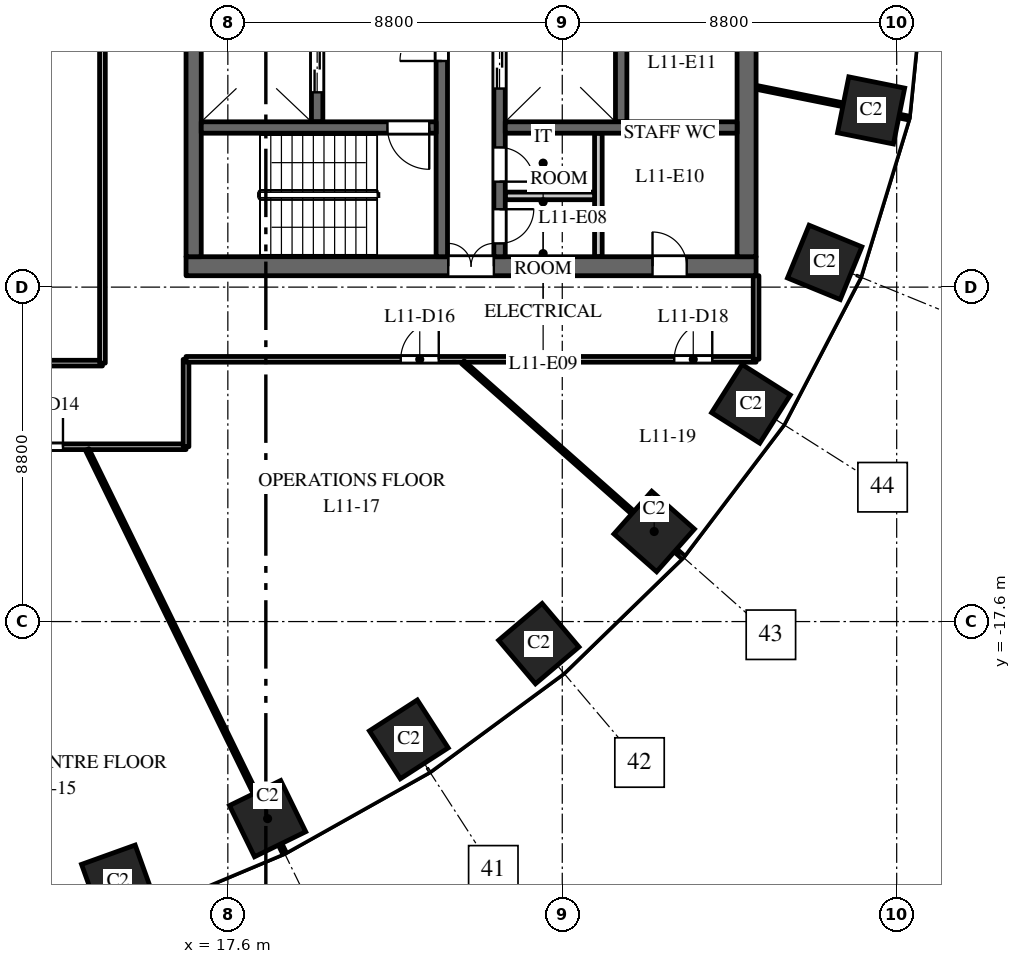
"""IFC4 building model, lengths in metres.
Left out: names, types, materials, properties, quantities, classifications, styles, units other than length and angle.
Written with IfcOpenShell. Run it as: python <this file> out.ifc"""

import sys

from ifc_helpers import new_model, si_unit, direction, frame, frame_2d, origin, origin_2d, place, context, subcontext, project, spatial, rectangle, extrude, element, fill, save


model = new_model("IFC4")
c1 = context("Model", 3, precision=1e-05, world=origin(), true_north=direction((0.0, 1.0)))
c2 = subcontext(c1, "Body", "Model", "MODEL_VIEW")
j1 = project(units=[si_unit("LENGTHUNIT", "METRE"), si_unit("PLANEANGLEUNIT", "RADIAN")], contexts=[c1])
p1 = place(None, origin())
s1 = spatial("IfcSite", under=j1, at=p1, CompositionType="ELEMENT")
p2 = place(p1, origin())
s2 = spatial("IfcBuilding", under=s1, at=p2, CompositionType="ELEMENT")
p3 = place(p2, frame((0.0, 0.0, 54.5)))
s3 = spatial("IfcBuildingStorey", under=s2, at=p3, CompositionType="ELEMENT", Elevation=54.5)
for number, where, z_axis, x_axis in (
    (1, (14.709, -24.441, 0.0), (0.0, 0.0, 1.0), (0.941, 0.338, 0.0)),
    (2, (18.646, -22.785, 0.0), (0.0, 0.0, 1.0), (0.898, 0.439, 0.0)),
    (3, (22.362, -20.7, 0.0), (0.0, 0.0, 1.0), (0.84, 0.542, 0.0)),
    (4, (25.783, -18.18, 0.0), (0.0, 0.0, 1.0), (0.763, 0.646, 0.0)),
    (5, (28.819, -15.23, 0.0), (0.0, 0.0, 1.0), (0.663, 0.749, 0.0)),
    (6, (31.365, -11.871, 0.0), (0.0, 0.0, 1.0), (0.535, 0.845, 0.0)),
    (7, (33.305, -8.149, 0.0), (0.0, 0.0, 1.0), (0.379, 0.925, 0.0)),
    (8, (34.527, -4.151, 0.0), (0.0, 0.0, 1.0), (0.197, 0.98, 0.0)),
):
    element("IfcColumn", number, at=place(p3, frame(where, z_axis=z_axis, x_axis=x_axis)), inside=s3, PredefinedType="COLUMN", context=c2, shape_type="SweptSolid", body=[
        extrude(rectangle(XDim=1.5, YDim=1.5, at=origin_2d()), origin(), (0.0, 0.0, 1.0), 4.0),
    ])
p4 = place(p3, frame((16.5, -8.25, 0.0), z_axis=(0.0, 0.0, 1.0), x_axis=(1.0, 0.0, 0.0)))
e9 = element("IfcWall", 9, at=p4, inside=s3, PredefinedType="SHEAR", context=c2, shape_type="SweptSolid", body=[
    extrude(rectangle(XDim=15.0, YDim=0.5, at=frame_2d((7.5, 0.0))), origin(), (0.0, 0.0, 1.0), 3.7),
])
p5 = place(p4, frame((6.9, 0.0, 0.0)))
e10 = element("IfcOpeningElement", 10, at=p5, cuts=e9, PredefinedType="OPENING", context=c2, shape_type="SweptSolid", body=[
    extrude(rectangle(XDim=1.2, YDim=2.1, at=frame_2d((0.6, 1.05))), frame((0.0, 0.26, 0.0), z_axis=(0.0, -1.0, 0.0), x_axis=(1.0, 0.0, 0.0)), (0.0, 0.0, 1.0), 0.52),
])
p6 = place(p4, frame((12.275, 0.0, 0.0)))
e11 = element("IfcOpeningElement", 11, at=p6, cuts=e9, PredefinedType="OPENING", context=c2, shape_type="SweptSolid", body=[
    extrude(rectangle(XDim=0.9, YDim=2.1, at=frame_2d((0.45, 1.05))), frame((0.0, 0.26, 0.0), z_axis=(0.0, -1.0, 0.0), x_axis=(1.0, 0.0, 0.0)), (0.0, 0.0, 1.0), 0.52),
])
p7 = place(p3, frame((27.95, -4.45, 0.0), z_axis=(0.0, 0.0, 1.0), x_axis=(0.0, 1.0, 0.0)))
e12 = element("IfcWall", 12, at=p7, inside=s3, PredefinedType="SHEAR", context=c2, shape_type="SweptSolid", body=[
    extrude(rectangle(XDim=8.9, YDim=0.3, at=frame_2d((4.45, 0.0))), origin(), (0.0, 0.0, 1.0), 3.7),
])
p8 = place(p3, frame((19.95, -4.45, 0.0), z_axis=(0.0, 0.0, 1.0), x_axis=(0.0, 1.0, 0.0)))
e13 = element("IfcWall", 13, at=p8, inside=s3, PredefinedType="SHEAR", context=c2, shape_type="SweptSolid", body=[
    extrude(rectangle(XDim=8.9, YDim=0.3, at=frame_2d((4.45, 0.0))), origin(), (0.0, 0.0, 1.0), 3.7),
])
p9 = place(p8, frame((0.775, 0.0, 0.0)))
e14 = element("IfcOpeningElement", 14, at=p9, cuts=e13, PredefinedType="OPENING", context=c2, shape_type="SweptSolid", body=[
    extrude(rectangle(XDim=1.2, YDim=2.1, at=frame_2d((0.6, 1.05))), frame((0.0, 0.16, 0.0), z_axis=(0.0, -1.0, 0.0), x_axis=(1.0, 0.0, 0.0)), (0.0, 0.0, 1.0), 0.32),
])
p10 = place(p8, frame((4.788, 0.0, 0.0)))
e15 = element("IfcOpeningElement", 15, at=p10, cuts=e13, PredefinedType="OPENING", context=c2, shape_type="SweptSolid", body=[
    extrude(rectangle(XDim=0.9, YDim=2.1, at=frame_2d((0.45, 1.05))), frame((0.0, 0.16, 0.0), z_axis=(0.0, -1.0, 0.0), x_axis=(1.0, 0.0, 0.0)), (0.0, 0.0, 1.0), 0.32),
])
p11 = place(p8, frame((7.337, 0.0, 0.0)))
e16 = element("IfcOpeningElement", 16, at=p11, cuts=e13, PredefinedType="OPENING", context=c2, shape_type="SweptSolid", body=[
    extrude(rectangle(XDim=0.9, YDim=2.1, at=frame_2d((0.45, 1.05))), frame((0.0, 0.16, 0.0), z_axis=(0.0, -1.0, 0.0), x_axis=(1.0, 0.0, 0.0)), (0.0, 0.0, 1.0), 0.32),
])
p12 = place(p3, frame((24.75, -8.0, 0.0), z_axis=(0.0, 0.0, 1.0), x_axis=(0.0, 1.0, 0.0)))
e17 = element("IfcWall", 17, at=p12, inside=s3, PredefinedType="SHEAR", context=c2, shape_type="SweptSolid", body=[
    extrude(rectangle(XDim=16.0, YDim=0.3, at=frame_2d((8.0, 0.0))), origin(), (0.0, 0.0, 1.0), 3.7),
])
p13 = place(p12, frame((4.425, 0.0, 0.0)))
e18 = element("IfcOpeningElement", 18, at=p13, cuts=e17, PredefinedType="OPENING", context=c2, shape_type="SweptSolid", body=[
    extrude(rectangle(XDim=1.1, YDim=2.1, at=frame_2d((0.55, 1.05))), frame((0.0, 0.16, 0.0), z_axis=(0.0, -1.0, 0.0), x_axis=(1.0, 0.0, 0.0)), (0.0, 0.0, 1.0), 0.32),
])
p14 = place(p12, frame((7.45, 0.0, 0.0)))
e19 = element("IfcOpeningElement", 19, at=p14, cuts=e17, PredefinedType="OPENING", context=c2, shape_type="SweptSolid", body=[
    extrude(rectangle(XDim=1.1, YDim=2.1, at=frame_2d((0.55, 1.05))), frame((0.0, 0.16, 0.0), z_axis=(0.0, -1.0, 0.0), x_axis=(1.0, 0.0, 0.0)), (0.0, 0.0, 1.0), 0.32),
])
p15 = place(p12, frame((10.425, 0.0, 0.0)))
e20 = element("IfcOpeningElement", 20, at=p15, cuts=e17, PredefinedType="OPENING", context=c2, shape_type="SweptSolid", body=[
    extrude(rectangle(XDim=1.2, YDim=2.1, at=frame_2d((0.6, 1.05))), frame((0.0, 0.16, 0.0), z_axis=(0.0, -1.0, 0.0), x_axis=(1.0, 0.0, 0.0)), (0.0, 0.0, 1.0), 0.32),
])
p16 = place(p12, frame((13.75, 0.0, 0.0)))
e21 = element("IfcOpeningElement", 21, at=p16, cuts=e17, PredefinedType="OPENING", context=c2, shape_type="SweptSolid", body=[
    extrude(rectangle(XDim=0.9, YDim=2.1, at=frame_2d((0.45, 1.05))), frame((0.0, 0.16, 0.0), z_axis=(0.0, -1.0, 0.0), x_axis=(1.0, 0.0, 0.0)), (0.0, 0.0, 1.0), 0.32),
])
p17 = place(p12, frame((1.975, 0.0, 0.0)))
e22 = element("IfcOpeningElement", 22, at=p17, cuts=e17, PredefinedType="OPENING", context=c2, shape_type="SweptSolid", body=[
    extrude(rectangle(XDim=0.9, YDim=2.1, at=frame_2d((0.45, 1.05))), frame((0.0, 0.16, 0.0), z_axis=(0.0, -1.0, 0.0), x_axis=(1.0, 0.0, 0.0)), (0.0, 0.0, 1.0), 0.32),
])
p18 = place(p12, frame((0.35, 0.0, 0.0)))
e23 = element("IfcOpeningElement", 23, at=p18, cuts=e17, PredefinedType="OPENING", context=c2, shape_type="SweptSolid", body=[
    extrude(rectangle(XDim=0.9, YDim=2.1, at=frame_2d((0.45, 1.05))), frame((0.0, 0.16, 0.0), z_axis=(0.0, -1.0, 0.0), x_axis=(1.0, 0.0, 0.0)), (0.0, 0.0, 1.0), 0.32),
])
p19 = place(p3, frame((16.7, -8.0, 0.0), z_axis=(0.0, 0.0, 1.0), x_axis=(0.0, 1.0, 0.0)))
e24 = element("IfcWall", 24, at=p19, inside=s3, PredefinedType="SHEAR", context=c2, shape_type="SweptSolid", body=[
    extrude(rectangle(XDim=16.0, YDim=0.4, at=frame_2d((8.0, 0.0))), origin(), (0.0, 0.0, 1.0), 3.7),
])
p20 = place(p3, frame((31.25, -8.0, 0.0), z_axis=(0.0, 0.0, 1.0), x_axis=(0.0, 1.0, 0.0)))
e25 = element("IfcWall", 25, at=p20, inside=s3, PredefinedType="SHEAR", context=c2, shape_type="SweptSolid", body=[
    extrude(rectangle(XDim=16.0, YDim=0.5, at=frame_2d((8.0, 0.0))), origin(), (0.0, 0.0, 1.0), 3.7),
])
p21 = place(p3, frame((27.35, -8.0, 0.0), z_axis=(0.0, 0.0, 1.0), x_axis=(0.0, 1.0, 0.0)))
e26 = element("IfcWall", 26, at=p21, inside=s3, PredefinedType="PARTITIONING", context=c2, shape_type="SweptSolid", body=[
    extrude(rectangle(XDim=3.25, YDim=0.2, at=frame_2d((1.625, 0.0))), origin(), (0.0, 0.0, 1.0), 3.7),
])
p22 = place(p3, frame((24.9, -6.4, 0.0), z_axis=(0.0, 0.0, 1.0), x_axis=(1.0, 0.0, 0.0)))
e27 = element("IfcWall", 27, at=p22, inside=s3, PredefinedType="PARTITIONING", context=c2, shape_type="SweptSolid", body=[
    extrude(rectangle(XDim=2.35, YDim=0.2, at=frame_2d((1.175, 0.0))), origin(), (0.0, 0.0, 1.0), 3.7),
])
p23 = place(p3, frame((24.9, -4.6, 0.0), z_axis=(0.0, 0.0, 1.0), x_axis=(1.0, 0.0, 0.0)))
e28 = element("IfcWall", 28, at=p23, inside=s3, PredefinedType="SHEAR", context=c2, shape_type="SweptSolid", body=[
    extrude(rectangle(XDim=6.1, YDim=0.3, at=frame_2d((3.05, 0.0))), origin(), (0.0, 0.0, 1.0), 3.7),
])
p24 = place(p3, frame((23.23, -8.0, 0.0), z_axis=(0.0, 0.0, 1.0), x_axis=(0.0, 1.0, 0.0)))
e29 = element("IfcWall", 29, at=p24, inside=s3, PredefinedType="SHEAR", context=c2, shape_type="SweptSolid", body=[
    extrude(rectangle(XDim=7.875, YDim=0.3, at=frame_2d((3.938, 0.0))), origin(), (0.0, 0.0, 1.0), 3.7),
])
p25 = place(p24, frame((5.15, 0.0, 0.0)))
e30 = element("IfcOpeningElement", 30, at=p25, cuts=e29, PredefinedType="OPENING", context=c2, shape_type="SweptSolid", body=[
    extrude(rectangle(XDim=1.1, YDim=2.1, at=frame_2d((0.55, 1.05))), frame((0.0, 0.16, 0.0), z_axis=(0.0, -1.0, 0.0), x_axis=(1.0, 0.0, 0.0)), (0.0, 0.0, 1.0), 0.32),
])
p26 = place(p3, frame((16.9, -4.6, 0.0), z_axis=(0.0, 0.0, 1.0), x_axis=(1.0, 0.0, 0.0)))
e31 = element("IfcWall", 31, at=p26, inside=s3, PredefinedType="SHEAR", context=c2, shape_type="SweptSolid", body=[
    extrude(rectangle(XDim=6.18, YDim=0.3, at=frame_2d((3.09, 0.0))), origin(), (0.0, 0.0, 1.0), 3.7),
])
p27 = place(p26, frame((4.9, 0.0, 0.0)))
e32 = element("IfcOpeningElement", 32, at=p27, cuts=e31, PredefinedType="OPENING", context=c2, shape_type="SweptSolid", body=[
    extrude(rectangle(XDim=1.1, YDim=2.1, at=frame_2d((0.55, 1.05))), frame((0.0, 0.16, 0.0), z_axis=(0.0, -1.0, 0.0), x_axis=(1.0, 0.0, 0.0)), (0.0, 0.0, 1.0), 0.32),
])
p28 = place(p3, frame((-14.3, -10.8, 0.0), z_axis=(0.0, 0.0, 1.0), x_axis=(1.0, 0.0, 0.0)))
e33 = element("IfcWall", 33, at=p28, inside=s3, PredefinedType="PARTITIONING", context=c2, shape_type="SweptSolid", body=[
    extrude(rectangle(XDim=28.6, YDim=0.15, at=frame_2d((14.3, 0.0))), origin(), (0.0, 0.0, 1.0), 2.85),
])
p29 = place(p28, frame((10.627, 0.0, 0.0)))
e34 = element("IfcOpeningElement", 34, at=p29, cuts=e33, PredefinedType="OPENING", context=c2, shape_type="SweptSolid", body=[
    extrude(rectangle(XDim=1.0, YDim=2.1, at=frame_2d((0.5, 1.05))), frame((0.0, 0.085, 0.0), z_axis=(0.0, -1.0, 0.0), x_axis=(1.0, 0.0, 0.0)), (0.0, 0.0, 1.0), 0.17),
])
p30 = place(p28, frame((15.393, 0.0, 0.0)))
e35 = element("IfcOpeningElement", 35, at=p30, cuts=e33, PredefinedType="OPENING", context=c2, shape_type="SweptSolid", body=[
    extrude(rectangle(XDim=1.0, YDim=2.1, at=frame_2d((0.5, 1.05))), frame((0.0, 0.085, 0.0), z_axis=(0.0, -1.0, 0.0), x_axis=(1.0, 0.0, 0.0)), (0.0, 0.0, 1.0), 0.17),
])
p31 = place(p3, frame((0.701, -13.0, 0.0), z_axis=(0.0, 0.0, 1.0), x_axis=(1.0, 0.0, 0.0)))
e36 = element("IfcWall", 36, at=p31, inside=s3, PredefinedType="PARTITIONING", context=c2, shape_type="SweptSolid", body=[
    extrude(rectangle(XDim=15.799, YDim=0.15, at=frame_2d((7.899, 0.0))), origin(), (0.0, 0.0, 1.0), 2.85),
])
p32 = place(p31, frame((11.561, 0.0, 0.0)))
e37 = element("IfcOpeningElement", 37, at=p32, cuts=e36, PredefinedType="OPENING", context=c2, shape_type="SweptSolid", body=[
    extrude(rectangle(XDim=1.0, YDim=2.1, at=frame_2d((0.5, 1.05))), frame((0.0, 0.085, 0.0), z_axis=(0.0, -1.0, 0.0), x_axis=(1.0, 0.0, 0.0)), (0.0, 0.0, 1.0), 0.17),
])
p33 = place(p3, frame((13.899, -13.075, 0.0), z_axis=(0.0, 0.0, 1.0), x_axis=(0.439199750603, -0.898389436197, 0.0)))
e38 = element("IfcWall", 38, at=p33, inside=s3, PredefinedType="PARTITIONING", context=c2, shape_type="SweptSolid", body=[
    extrude(rectangle(XDim=11.81, YDim=0.1, at=frame_2d((5.905, 0.0))), origin(), (0.0, 0.0, 1.0), 2.85),
])
p34 = place(p3, frame((14.3, -10.8, 0.0), z_axis=(0.0, 0.0, 1.0), x_axis=(0.0, 1.0, 0.0)))
e39 = element("IfcWall", 39, at=p34, inside=s3, PredefinedType="PARTITIONING", context=c2, shape_type="SweptSolid", body=[
    extrude(rectangle(XDim=21.6, YDim=0.15, at=frame_2d((10.8, 0.0))), origin(), (0.0, 0.0, 1.0), 2.75),
])
p35 = place(p34, frame((19.95, 0.0, 0.0)))
e40 = element("IfcOpeningElement", 40, at=p35, cuts=e39, PredefinedType="OPENING", context=c2, shape_type="SweptSolid", body=[
    extrude(rectangle(XDim=1.0, YDim=2.1, at=frame_2d((0.5, 1.05))), frame((0.0, 0.085, 0.0), z_axis=(0.0, -1.0, 0.0), x_axis=(1.0, 0.0, 0.0)), (0.0, 0.0, 1.0), 0.17),
])
p36 = place(p3, frame((16.5, -13.0, 0.0), z_axis=(0.0, 0.0, 1.0), x_axis=(0.0, 1.0, 0.0)))
e41 = element("IfcWall", 41, at=p36, inside=s3, PredefinedType="PARTITIONING", context=c2, shape_type="SweptSolid", body=[
    extrude(rectangle(XDim=2.3, YDim=0.15, at=frame_2d((1.15, 0.0))), origin(), (0.0, 0.0, 1.0), 3.7),
])
p37 = place(p3, frame((16.5, -10.7, 0.0), z_axis=(0.0, 0.0, 1.0), x_axis=(1.0, 0.0, 0.0)))
e42 = element("IfcWall", 42, at=p37, inside=s3, PredefinedType="PARTITIONING", context=c2, shape_type="SweptSolid", body=[
    extrude(rectangle(XDim=15.0, YDim=0.15, at=frame_2d((7.5, 0.0))), origin(), (0.0, 0.0, 1.0), 2.75),
])
p38 = place(p37, frame((5.65, 0.0, 0.0)))
e43 = element("IfcOpeningElement", 43, at=p38, cuts=e42, PredefinedType="OPENING", context=c2, shape_type="SweptSolid", body=[
    extrude(rectangle(XDim=1.0, YDim=2.1, at=frame_2d((0.5, 1.05))), frame((0.0, 0.085, 0.0), z_axis=(0.0, -1.0, 0.0), x_axis=(1.0, 0.0, 0.0)), (0.0, 0.0, 1.0), 0.17),
])
p39 = place(p37, frame((12.847, 0.0, 0.0)))
e44 = element("IfcOpeningElement", 44, at=p39, cuts=e42, PredefinedType="OPENING", context=c2, shape_type="SweptSolid", body=[
    extrude(rectangle(XDim=1.0, YDim=2.1, at=frame_2d((0.5, 1.05))), frame((0.0, 0.085, 0.0), z_axis=(0.0, -1.0, 0.0), x_axis=(1.0, 0.0, 0.0)), (0.0, 0.0, 1.0), 0.17),
])
p40 = place(p3, frame((23.785, -10.778, 0.0), z_axis=(0.0, 0.0, 1.0), x_axis=(0.748985701008, -0.662586160198, 0.0)))
e45 = element("IfcWall", 45, at=p40, inside=s3, PredefinedType="PARTITIONING", context=c2, shape_type="SweptSolid", body=[
    extrude(rectangle(XDim=7.723, YDim=0.1, at=frame_2d((3.861, 0.0))), origin(), (0.0, 0.0, 1.0), 3.7),
])
p41 = place(p3, frame((31.5, -10.7, 0.0), z_axis=(0.0, 0.0, 1.0), x_axis=(0.0, 1.0, 0.0)))
e46 = element("IfcWall", 46, at=p41, inside=s3, PredefinedType="PARTITIONING", context=c2, shape_type="SweptSolid", body=[
    extrude(rectangle(XDim=2.2, YDim=0.15, at=frame_2d((1.1, 0.0))), origin(), (0.0, 0.0, 1.0), 2.85),
])
p42 = place(p3, frame((31.5, -3.542, 0.0), z_axis=(0.0, 0.0, 1.0), x_axis=(0.980357474535, -0.197228857227, 0.0)))
e47 = element("IfcWall", 47, at=p42, inside=s3, PredefinedType="PARTITIONING", context=c2, shape_type="SweptSolid", body=[
    extrude(rectangle(XDim=4.092, YDim=0.1, at=frame_2d((2.046, 0.0))), origin(), (0.0, 0.0, 1.0), 2.85),
])
p43 = place(p9, origin())
e48 = element("IfcDoor", 48, at=p43, inside=s3, OperationType="DOUBLE_DOOR_SLIDING", PredefinedType="DOOR", context=c2, shape_type="SweptSolid", body=[
    extrude(rectangle(XDim=1.2, YDim=2.1, at=frame_2d((0.6, 1.05))), frame((0.0, 0.025, 0.0), z_axis=(0.0, -1.0, 0.0), x_axis=(1.0, 0.0, 0.0)), (0.0, 0.0, 1.0), 0.05),
])
fill(e14, e48)
p44 = place(p13, origin())
e49 = element("IfcDoor", 49, at=p44, inside=s3, OperationType="DOUBLE_DOOR_SLIDING", PredefinedType="DOOR", context=c2, shape_type="SweptSolid", body=[
    extrude(rectangle(XDim=1.1, YDim=2.1, at=frame_2d((0.55, 1.05))), frame((0.0, 0.025, 0.0), z_axis=(0.0, -1.0, 0.0), x_axis=(1.0, 0.0, 0.0)), (0.0, 0.0, 1.0), 0.05),
])
fill(e18, e49)
p45 = place(p27, origin())
e50 = element("IfcDoor", 50, at=p45, inside=s3, OperationType="SINGLE_SWING_RIGHT", PredefinedType="DOOR", context=c2, shape_type="SweptSolid", body=[
    extrude(rectangle(XDim=1.1, YDim=2.1, at=frame_2d((0.55, 1.05))), frame((0.0, 0.025, 0.0), z_axis=(0.0, -1.0, 0.0), x_axis=(1.0, 0.0, 0.0)), (0.0, 0.0, 1.0), 0.05),
])
fill(e32, e50)
p46 = place(p25, origin())
e51 = element("IfcDoor", 51, at=p46, inside=s3, OperationType="SINGLE_SWING_RIGHT", PredefinedType="DOOR", context=c2, shape_type="SweptSolid", body=[
    extrude(rectangle(XDim=1.1, YDim=2.1, at=frame_2d((0.55, 1.05))), frame((0.0, 0.025, 0.0), z_axis=(0.0, -1.0, 0.0), x_axis=(1.0, 0.0, 0.0)), (0.0, 0.0, 1.0), 0.05),
])
fill(e30, e51)
p47 = place(p5, origin())
e52 = element("IfcDoor", 52, at=p47, inside=s3, OperationType="DOUBLE_DOOR_DOUBLE_SWING", PredefinedType="DOOR", context=c2, shape_type="SweptSolid", body=[
    extrude(rectangle(XDim=1.2, YDim=2.1, at=frame_2d((0.6, 1.05))), frame((0.0, 0.025, 0.0), z_axis=(0.0, -1.0, 0.0), x_axis=(1.0, 0.0, 0.0)), (0.0, 0.0, 1.0), 0.05),
])
fill(e10, e52)
p48 = place(p17, origin())
e53 = element("IfcDoor", 53, at=p48, inside=s3, OperationType="SINGLE_SWING_LEFT", PredefinedType="DOOR", context=c2, shape_type="SweptSolid", body=[
    extrude(rectangle(XDim=0.9, YDim=2.1, at=frame_2d((0.45, 1.05))), frame((0.0, 0.025, 0.0), z_axis=(0.0, -1.0, 0.0), x_axis=(1.0, 0.0, 0.0)), (0.0, 0.0, 1.0), 0.05),
])
fill(e22, e53)
p49 = place(p18, origin())
e54 = element("IfcDoor", 54, at=p49, inside=s3, OperationType="SINGLE_SWING_RIGHT", PredefinedType="DOOR", context=c2, shape_type="SweptSolid", body=[
    extrude(rectangle(XDim=0.9, YDim=2.1, at=frame_2d((0.45, 1.05))), frame((0.0, 0.025, 0.0), z_axis=(0.0, -1.0, 0.0), x_axis=(1.0, 0.0, 0.0)), (0.0, 0.0, 1.0), 0.05),
])
fill(e23, e54)
p50 = place(p6, origin())
e55 = element("IfcDoor", 55, at=p50, inside=s3, OperationType="SINGLE_SWING_RIGHT", PredefinedType="DOOR", context=c2, shape_type="SweptSolid", body=[
    extrude(rectangle(XDim=0.9, YDim=2.1, at=frame_2d((0.45, 1.05))), frame((0.0, 0.025, 0.0), z_axis=(0.0, -1.0, 0.0), x_axis=(1.0, 0.0, 0.0)), (0.0, 0.0, 1.0), 0.05),
])
fill(e11, e55)
p51 = place(p32, origin())
e56 = element("IfcDoor", 56, at=p51, inside=s3, OperationType="SINGLE_SWING_RIGHT", PredefinedType="DOOR", context=c2, shape_type="SweptSolid", body=[
    extrude(rectangle(XDim=1.0, YDim=2.1, at=frame_2d((0.5, 1.05))), frame((0.0, 0.025, 0.0), z_axis=(0.0, -1.0, 0.0), x_axis=(1.0, 0.0, 0.0)), (0.0, 0.0, 1.0), 0.05),
])
fill(e37, e56)
p52 = place(p38, origin())
e57 = element("IfcDoor", 57, at=p52, inside=s3, OperationType="SINGLE_SWING_RIGHT", PredefinedType="DOOR", context=c2, shape_type="SweptSolid", body=[
    extrude(rectangle(XDim=1.0, YDim=2.1, at=frame_2d((0.5, 1.05))), frame((0.0, 0.025, 0.0), z_axis=(0.0, -1.0, 0.0), x_axis=(1.0, 0.0, 0.0)), (0.0, 0.0, 1.0), 0.05),
])
fill(e43, e57)
p53 = place(p39, origin())
e58 = element("IfcDoor", 58, at=p53, inside=s3, OperationType="SINGLE_SWING_RIGHT", PredefinedType="DOOR", context=c2, shape_type="SweptSolid", body=[
    extrude(rectangle(XDim=1.0, YDim=2.1, at=frame_2d((0.5, 1.05))), frame((0.0, 0.025, 0.0), z_axis=(0.0, -1.0, 0.0), x_axis=(1.0, 0.0, 0.0)), (0.0, 0.0, 1.0), 0.05),
])
fill(e44, e58)
save(model, sys.argv[1])
